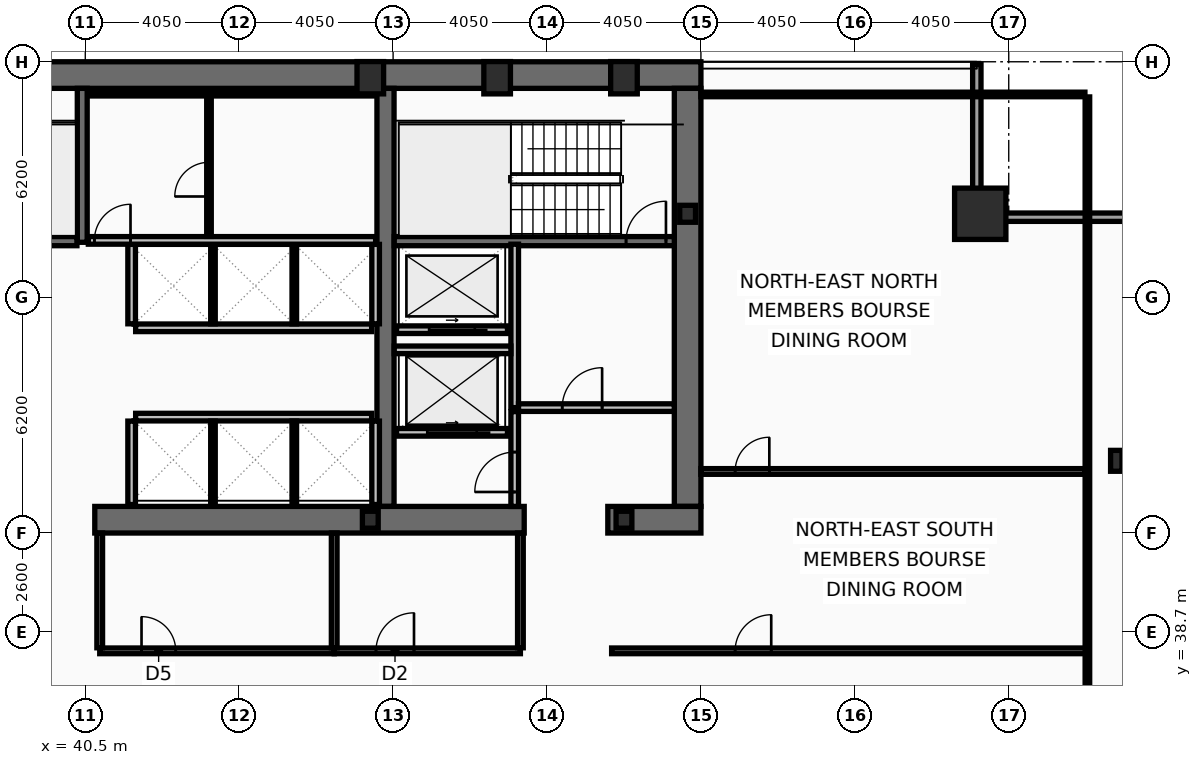
"""IFC4 building model, lengths in metres.
Left out: names, types, materials, properties, quantities, classifications, styles, units other than length and angle.
Written with IfcOpenShell. Run it as: python <this file> out.ifc"""

import sys

from ifc_helpers import new_model, si_unit, direction, frame, frame_2d, origin, origin_2d, place, context, subcontext, project, spatial, rectangle, hollow_rectangle, i_section, extrude, element, fill, save


model = new_model("IFC4")
c1 = context("Model", 3, precision=1e-05, world=origin(), true_north=direction((0.0, 1.0)))
c2 = subcontext(c1, "Body", "Model", "MODEL_VIEW")
j1 = project(units=[si_unit("LENGTHUNIT", "METRE"), si_unit("PLANEANGLEUNIT", "RADIAN")], contexts=[c1])
p1 = place(None, origin())
s1 = spatial("IfcSite", under=j1, at=p1, CompositionType="ELEMENT")
p2 = place(p1, origin())
s2 = spatial("IfcBuilding", under=s1, at=p2, CompositionType="ELEMENT")
p3 = place(p2, frame((0.0, 0.0, 168.6)))
s3 = spatial("IfcBuildingStorey", under=s2, at=p3, CompositionType="ELEMENT", Elevation=168.6)
p4 = place(p3, frame((16.2, 53.35, 0.0), z_axis=(0.0, 0.0, 1.0), x_axis=(1.0, 0.0, 0.0)))
e1 = element("IfcWall", 1, at=p4, inside=s3, PredefinedType="SHEAR", context=c2, shape_type="SweptSolid", body=[
    extrude(rectangle(XDim=40.5, YDim=0.7, at=frame_2d((20.25, 0.0))), origin(), (0.0, 0.0, 1.0), 3.38),
])
p5 = place(p3, frame((56.35, 53.0, 0.0), z_axis=(0.0, 0.0, 1.0), x_axis=(0.0, -1.0, 0.0)))
e2 = element("IfcWall", 2, at=p5, inside=s3, PredefinedType="SHEAR", context=c2, shape_type="SweptSolid", body=[
    extrude(rectangle(XDim=11.0, YDim=0.7, at=frame_2d((5.5, 0.0))), origin(), (0.0, 0.0, 1.0), 3.38),
])
p6 = place(p3, frame((48.4, 42.0, 0.0), z_axis=(0.0, 0.0, 1.0), x_axis=(0.0, 1.0, 0.0)))
e3 = element("IfcWall", 3, at=p6, inside=s3, PredefinedType="SHEAR", context=c2, shape_type="SweptSolid", body=[
    extrude(rectangle(XDim=11.0, YDim=0.45, at=frame_2d((5.5, 0.0))), origin(), (0.0, 0.0, 1.0), 3.38),
])
p7 = place(p3, frame((52.05, 41.65, 0.0), z_axis=(0.0, 0.0, 1.0), x_axis=(-1.0, 0.0, 0.0)))
e4 = element("IfcWall", 4, at=p7, inside=s3, PredefinedType="SHEAR", context=c2, shape_type="SweptSolid", body=[
    extrude(rectangle(XDim=11.3, YDim=0.7, at=frame_2d((5.65, 0.0))), origin(), (0.0, 0.0, 1.0), 3.38),
])
p8 = place(p3, frame((56.7, 41.65, 0.0), z_axis=(0.0, 0.0, 1.0), x_axis=(-1.0, 0.0, 0.0)))
e5 = element("IfcWall", 5, at=p8, inside=s3, PredefinedType="SHEAR", context=c2, shape_type="SweptSolid", body=[
    extrude(rectangle(XDim=2.45, YDim=0.7, at=frame_2d((1.225, 0.0))), origin(), (0.0, 0.0, 1.0), 3.38),
])
p9 = place(p3, frame((40.42, 48.95, 0.0), z_axis=(0.0, 0.0, 1.0), x_axis=(0.0, 1.0, 0.0)))
e6 = element("IfcWall", 6, at=p9, inside=s3, PredefinedType="SHEAR", context=c2, shape_type="SweptSolid", body=[
    extrude(rectangle(XDim=4.05, YDim=0.26, at=frame_2d((2.025, 0.0))), origin(), (0.0, 0.0, 1.0), 3.38),
])
p10 = place(p3, frame((48.63, 48.98, 0.0), z_axis=(0.0, 0.0, 1.0), x_axis=(1.0, 0.0, 0.0)))
e7 = element("IfcWall", 7, at=p10, inside=s3, PredefinedType="SHEAR", context=c2, shape_type="SweptSolid", body=[
    extrude(rectangle(XDim=7.37, YDim=0.24, at=frame_2d((3.685, 0.0))), origin(), (0.0, 0.0, 1.0), 3.38),
])
p11 = place(p10, frame((6.1, 0.0, 0.0)))
e8 = element("IfcOpeningElement", 8, at=p11, cuts=e7, PredefinedType="OPENING", context=c2, shape_type="SweptSolid", body=[
    extrude(rectangle(XDim=1.05, YDim=2.15, at=frame_2d((0.525, 1.075))), frame((0.0, 0.13, 0.0), z_axis=(0.0, -1.0, 0.0), x_axis=(1.0, 0.0, 0.0)), (0.0, 0.0, 1.0), 0.26),
])
p12 = place(p3, frame((32.72, 48.98, 0.0), z_axis=(0.0, 0.0, 1.0), x_axis=(1.0, 0.0, 0.0)))
e9 = element("IfcWall", 9, at=p12, inside=s3, PredefinedType="SHEAR", context=c2, shape_type="SweptSolid", body=[
    extrude(rectangle(XDim=7.56, YDim=0.24, at=frame_2d((3.78, 0.0))), origin(), (0.0, 0.0, 1.0), 3.38),
])
p13 = place(p12, frame((0.22, 0.0, 0.0)))
e10 = element("IfcOpeningElement", 10, at=p13, cuts=e9, PredefinedType="OPENING", context=c2, shape_type="SweptSolid", body=[
    extrude(rectangle(XDim=1.05, YDim=2.15, at=frame_2d((0.525, 1.075))), frame((0.0, 0.13, 0.0), z_axis=(0.0, -1.0, 0.0), x_axis=(1.0, 0.0, 0.0)), (0.0, 0.0, 1.0), 0.26),
])
p14 = place(p3, frame((64.05, 49.7, 0.0), z_axis=(0.0, 0.0, 1.0), x_axis=(1.0, 0.0, 0.0)))
e11 = element("IfcColumn", 11, at=p14, inside=s3, PredefinedType="COLUMN", context=c2, shape_type="SweptSolid", body=[
    extrude(hollow_rectangle(XDim=1.35, YDim=1.35, WallThickness=0.065, at=origin_2d()), origin(), (0.0, 0.0, 1.0), 3.6),
])
for number, where, z_axis, x_axis in (
    (12, (48.0, 53.28, 0.0), (0.0, 0.0, 1.0), (1.0, 0.0, 0.0)),
    (13, (51.337, 53.28, 0.0), (0.0, 0.0, 1.0), (1.0, 0.0, 0.0)),
    (14, (54.675, 53.28, 0.0), (0.0, 0.0, 1.0), (1.0, 0.0, 0.0)),
):
    element("IfcColumn", number, at=place(p3, frame(where, z_axis=z_axis, x_axis=x_axis)), inside=s3, PredefinedType="COLUMN", context=c2, shape_type="SweptSolid", body=[
        extrude(hollow_rectangle(XDim=0.7, YDim=0.85, WallThickness=0.05, at=origin_2d()), origin(), (0.0, 0.0, 1.0), 3.6),
    ])
p15 = place(p3, frame((67.63, 43.2, 0.0), z_axis=(0.0, 0.0, 1.0), x_axis=(1.0, 0.0, 0.0)))
e15 = element("IfcColumn", 15, at=p15, inside=s3, PredefinedType="COLUMN", context=c2, shape_type="SweptSolid", body=[
    extrude(i_section(OverallWidth=0.3, OverallDepth=0.55, WebThickness=0.015, FlangeThickness=0.029, at=origin_2d()), origin(), (0.0, 0.0, 1.0), 3.6),
])
for number, where, z_axis, x_axis in (
    (16, (56.35, 49.7, 0.0), (0.0, 0.0, 1.0), (1.0, 0.0, 0.0)),
    (17, (48.0, 41.65, 0.0), (0.0, 0.0, 1.0), (1.0, 0.0, 0.0)),
    (18, (54.675, 41.65, 0.0), (0.0, 0.0, 1.0), (1.0, 0.0, 0.0)),
):
    element("IfcColumn", number, at=place(p3, frame(where, z_axis=z_axis, x_axis=x_axis)), inside=s3, PredefinedType="COLUMN", context=c2, shape_type="SweptSolid", body=[
        extrude(i_section(OverallWidth=0.416, OverallDepth=0.446, WebThickness=0.039, FlangeThickness=0.063, at=origin_2d()), origin(), (0.0, 0.0, 1.0), 3.6),
    ])
p16 = place(p3, frame((63.96, 53.63, 0.0), z_axis=(0.0, 0.0, 1.0), x_axis=(0.0, -1.0, 0.0)))
e19 = element("IfcWall", 19, at=p16, inside=s3, PredefinedType="SOLIDWALL", context=c2, shape_type="SweptSolid", body=[
    extrude(rectangle(XDim=3.91, YDim=0.22, at=frame_2d((1.955, 0.0))), origin(), (0.0, 0.0, 1.0), 2.77),
])
p17 = place(p3, frame((63.85, 49.61, 0.0), z_axis=(0.0, 0.0, 1.0), x_axis=(1.0, 0.0, 0.0)))
e20 = element("IfcWall", 20, at=p17, inside=s3, PredefinedType="SOLIDWALL", context=c2, shape_type="SweptSolid", body=[
    extrude(rectangle(XDim=4.22, YDim=0.22, at=frame_2d((2.11, 0.0))), origin(), (0.0, 0.0, 1.0), 2.77),
])
p18 = place(p3, frame((51.61, 43.95, 0.0), z_axis=(0.0, 0.0, 1.0), x_axis=(-1.0, 0.0, 0.0)))
e21 = element("IfcWall", 21, at=p18, inside=s3, PredefinedType="PARTITIONING", context=c2, shape_type="SweptSolid", body=[
    extrude(rectangle(XDim=2.92, YDim=0.2, at=frame_2d((1.46, 0.0))), origin(), (0.0, 0.0, 1.0), 3.38),
])
p19 = place(p18, frame((0.81, 0.0, 0.0)))
e22 = element("IfcOpeningElement", 22, at=p19, cuts=e21, PredefinedType="OPENING", context=c2, shape_type="SweptSolid", body=[
    extrude(rectangle(XDim=1.3, YDim=2.18, at=frame_2d((0.65, 1.09))), frame((0.0, 0.11, 0.0), z_axis=(0.0, -1.0, 0.0), x_axis=(1.0, 0.0, 0.0)), (0.0, 0.0, 1.0), 0.22),
])
p20 = place(p3, frame((51.61, 46.65, 0.0), z_axis=(0.0, 0.0, 1.0), x_axis=(-1.0, 0.0, 0.0)))
e23 = element("IfcWall", 23, at=p20, inside=s3, PredefinedType="PARTITIONING", context=c2, shape_type="SweptSolid", body=[
    extrude(rectangle(XDim=2.92, YDim=0.2, at=frame_2d((1.46, 0.0))), origin(), (0.0, 0.0, 1.0), 3.38),
])
p21 = place(p20, frame((0.86, 0.0, 0.0)))
e24 = element("IfcOpeningElement", 24, at=p21, cuts=e23, PredefinedType="OPENING", context=c2, shape_type="SweptSolid", body=[
    extrude(rectangle(XDim=1.2, YDim=2.18, at=frame_2d((0.6, 1.09))), frame((0.0, 0.11, 0.0), z_axis=(0.0, -1.0, 0.0), x_axis=(1.0, 0.0, 0.0)), (0.0, 0.0, 1.0), 0.22),
])
p22 = place(p3, frame((51.8, 44.6, 0.0), z_axis=(0.0, 0.0, 1.0), x_axis=(0.0, 1.0, 0.0)))
e25 = element("IfcWall", 25, at=p22, inside=s3, PredefinedType="PARTITIONING", context=c2, shape_type="SweptSolid", body=[
    extrude(rectangle(XDim=4.3, YDim=0.2, at=frame_2d((2.15, 0.0))), origin(), (0.0, 0.0, 1.0), 3.38),
])
p23 = place(p3, frame((51.9, 44.6, 0.0), z_axis=(0.0, 0.0, 1.0), x_axis=(1.0, 0.0, 0.0)))
e26 = element("IfcWall", 26, at=p23, inside=s3, PredefinedType="PARTITIONING", context=c2, shape_type="SweptSolid", body=[
    extrude(rectangle(XDim=4.1, YDim=0.2, at=frame_2d((2.05, 0.0))), origin(), (0.0, 0.0, 1.0), 3.38),
])
p24 = place(p23, frame((1.15, 0.0, 0.0)))
e27 = element("IfcOpeningElement", 27, at=p24, cuts=e26, PredefinedType="OPENING", context=c2, shape_type="SweptSolid", body=[
    extrude(rectangle(XDim=1.05, YDim=2.15, at=frame_2d((0.525, 1.075))), frame((0.0, 0.11, 0.0), z_axis=(0.0, -1.0, 0.0), x_axis=(1.0, 0.0, 0.0)), (0.0, 0.0, 1.0), 0.22),
])
p25 = place(p3, frame((48.63, 46.12, 0.0), z_axis=(0.0, 0.0, 1.0), x_axis=(1.0, 0.0, 0.0)))
e28 = element("IfcWall", 28, at=p25, inside=s3, PredefinedType="PARTITIONING", context=c2, shape_type="SweptSolid", body=[
    extrude(rectangle(XDim=3.07, YDim=0.2, at=frame_2d((1.535, 0.0))), origin(), (0.0, 0.0, 1.0), 3.38),
])
p26 = place(p3, frame((51.8, 42.0, 0.0), z_axis=(0.0, 0.0, 1.0), x_axis=(0.0, 1.0, 0.0)))
e29 = element("IfcWall", 29, at=p26, inside=s3, PredefinedType="PARTITIONING", context=c2, shape_type="SweptSolid", body=[
    extrude(rectangle(XDim=2.495, YDim=0.2, at=frame_2d((1.248, 0.0))), origin(), (0.0, 0.0, 1.0), 3.38),
])
p27 = place(p26, frame((0.38, 0.0, 0.0)))
e30 = element("IfcOpeningElement", 30, at=p27, cuts=e29, PredefinedType="OPENING", context=c2, shape_type="SweptSolid", body=[
    extrude(rectangle(XDim=1.05, YDim=2.15, at=frame_2d((0.525, 1.075))), frame((0.0, 0.11, 0.0), z_axis=(0.0, -1.0, 0.0), x_axis=(1.0, 0.0, 0.0)), (0.0, 0.0, 1.0), 0.22),
])
p28 = place(p3, frame((41.825, 46.7, 0.0), z_axis=(0.0, 0.0, 1.0), x_axis=(1.0, 0.0, 0.0)))
e31 = element("IfcWall", 31, at=p28, inside=s3, PredefinedType="PARTITIONING", context=c2, shape_type="SweptSolid", body=[
    extrude(rectangle(XDim=6.21, YDim=0.2, at=frame_2d((3.105, 0.0))), origin(), (0.0, 0.0, 1.0), 3.38),
])
for number, where, z_axis, x_axis in (
    (32, (41.72, 46.805, 0.0), (0.0, 0.0, 1.0), (0.0, 1.0, 0.0)),
    (33, (48.14, 46.805, 0.0), (0.0, 0.0, 1.0), (0.0, 1.0, 0.0)),
):
    element("IfcWall", number, at=place(p3, frame(where, z_axis=z_axis, x_axis=x_axis)), inside=s3, PredefinedType="PARTITIONING", context=c2, shape_type="SweptSolid", body=[
        extrude(rectangle(XDim=2.09, YDim=0.2, at=frame_2d((1.045, 0.0))), origin(), (0.0, 0.0, 1.0), 3.38),
    ])
for number, where, z_axis, x_axis in (
    (34, (43.86, 46.805, 0.0), (0.0, 0.0, 1.0), (0.0, 1.0, 0.0)),
    (35, (46.0, 46.805, 0.0), (0.0, 0.0, 1.0), (0.0, 1.0, 0.0)),
):
    element("IfcWall", number, at=place(p3, frame(where, z_axis=z_axis, x_axis=x_axis)), inside=s3, PredefinedType="PARTITIONING", context=c2, shape_type="SweptSolid", body=[
        extrude(rectangle(XDim=2.09, YDim=0.12, at=frame_2d((1.045, 0.0))), origin(), (0.0, 0.0, 1.0), 3.38),
    ])
p29 = place(p3, frame((41.825, 44.35, 0.0), z_axis=(0.0, 0.0, 1.0), x_axis=(1.0, 0.0, 0.0)))
e36 = element("IfcWall", 36, at=p29, inside=s3, PredefinedType="PARTITIONING", context=c2, shape_type="SweptSolid", body=[
    extrude(rectangle(XDim=6.21, YDim=0.2, at=frame_2d((3.105, 0.0))), origin(), (0.0, 0.0, 1.0), 3.38),
])
for number, where, z_axis, x_axis in (
    (37, (41.72, 42.05, 0.0), (0.0, 0.0, 1.0), (0.0, 1.0, 0.0)),
    (38, (48.14, 42.05, 0.0), (0.0, 0.0, 1.0), (0.0, 1.0, 0.0)),
):
    element("IfcWall", number, at=place(p3, frame(where, z_axis=z_axis, x_axis=x_axis)), inside=s3, PredefinedType="PARTITIONING", context=c2, shape_type="SweptSolid", body=[
        extrude(rectangle(XDim=2.195, YDim=0.2, at=frame_2d((1.098, 0.0))), origin(), (0.0, 0.0, 1.0), 3.38),
    ])
for number, where, z_axis, x_axis in (
    (39, (43.86, 42.05, 0.0), (0.0, 0.0, 1.0), (0.0, 1.0, 0.0)),
    (40, (46.0, 42.05, 0.0), (0.0, 0.0, 1.0), (0.0, 1.0, 0.0)),
):
    element("IfcWall", number, at=place(p3, frame(where, z_axis=z_axis, x_axis=x_axis)), inside=s3, PredefinedType="PARTITIONING", context=c2, shape_type="SweptSolid", body=[
        extrude(rectangle(XDim=2.195, YDim=0.12, at=frame_2d((1.098, 0.0))), origin(), (0.0, 0.0, 1.0), 3.38),
    ])
p30 = place(p3, frame((40.58, 52.86, 0.0), z_axis=(0.0, 0.0, 1.0), x_axis=(1.0, 0.0, 0.0)))
e41 = element("IfcWall", 41, at=p30, inside=s3, PredefinedType="PARTITIONING", context=c2, shape_type="SweptSolid", body=[
    extrude(rectangle(XDim=7.56, YDim=0.12, at=frame_2d((3.78, 0.0))), origin(), (0.0, 0.0, 1.0), 3.38),
])
p31 = place(p3, frame((40.58, 49.0, 0.0), z_axis=(0.0, 0.0, 1.0), x_axis=(1.0, 0.0, 0.0)))
e42 = element("IfcWall", 42, at=p31, inside=s3, PredefinedType="PARTITIONING", context=c2, shape_type="SweptSolid", body=[
    extrude(rectangle(XDim=7.56, YDim=0.2, at=frame_2d((3.78, 0.0))), origin(), (0.0, 0.0, 1.0), 3.38),
])
p32 = place(p31, frame((0.16, 0.0, 0.0)))
e43 = element("IfcOpeningElement", 43, at=p32, cuts=e42, PredefinedType="OPENING", context=c2, shape_type="SweptSolid", body=[
    extrude(rectangle(XDim=0.95, YDim=2.1, at=frame_2d((0.475, 1.05))), frame((0.0, 0.11, 0.0), z_axis=(0.0, -1.0, 0.0), x_axis=(1.0, 0.0, 0.0)), (0.0, 0.0, 1.0), 0.22),
])
p33 = place(p3, frame((43.755, 49.105, 0.0), z_axis=(0.0, 0.0, 1.0), x_axis=(0.0, 1.0, 0.0)))
e44 = element("IfcWall", 44, at=p33, inside=s3, PredefinedType="PARTITIONING", context=c2, shape_type="SweptSolid", body=[
    extrude(rectangle(XDim=3.69, YDim=0.12, at=frame_2d((1.845, 0.0))), origin(), (0.0, 0.0, 1.0), 3.38),
])
p34 = place(p33, frame((1.05, 0.0, 0.0)))
e45 = element("IfcOpeningElement", 45, at=p34, cuts=e44, PredefinedType="OPENING", context=c2, shape_type="SweptSolid", body=[
    extrude(rectangle(XDim=0.9, YDim=2.05, at=frame_2d((0.45, 1.025))), frame((0.0, 0.07, 0.0), z_axis=(0.0, -1.0, 0.0), x_axis=(1.0, 0.0, 0.0)), (0.0, 0.0, 1.0), 0.14),
])
p35 = place(p3, frame((40.88, 38.2, 0.0), z_axis=(0.0, 0.0, 1.0), x_axis=(1.0, 0.0, 0.0)))
e46 = element("IfcWall", 46, at=p35, inside=s3, PredefinedType="PARTITIONING", context=c2, shape_type="SweptSolid", body=[
    extrude(rectangle(XDim=6.17, YDim=0.15, at=frame_2d((3.085, 0.0))), origin(), (0.0, 0.0, 1.0), 2.67),
])
p36 = place(p35, frame((1.1, 0.0, 0.0)))
e47 = element("IfcOpeningElement", 47, at=p36, cuts=e46, PredefinedType="OPENING", context=c2, shape_type="SweptSolid", body=[
    extrude(rectangle(XDim=0.9, YDim=2.05, at=frame_2d((0.45, 1.025))), frame((0.0, 0.085, 0.0), z_axis=(0.0, -1.0, 0.0), x_axis=(1.0, 0.0, 0.0)), (0.0, 0.0, 1.0), 0.17),
])
p37 = place(p3, frame((47.05, 38.2, 0.0), z_axis=(0.0, 0.0, 1.0), x_axis=(1.0, 0.0, 0.0)))
e48 = element("IfcWall", 48, at=p37, inside=s3, PredefinedType="PARTITIONING", context=c2, shape_type="SweptSolid", body=[
    extrude(rectangle(XDim=4.9, YDim=0.15, at=frame_2d((2.45, 0.0))), origin(), (0.0, 0.0, 1.0), 2.67),
])
p38 = place(p37, frame((1.1, 0.0, 0.0)))
e49 = element("IfcOpeningElement", 49, at=p38, cuts=e48, PredefinedType="OPENING", context=c2, shape_type="SweptSolid", body=[
    extrude(rectangle(XDim=1.0, YDim=2.05, at=frame_2d((0.5, 1.025))), frame((0.0, 0.085, 0.0), z_axis=(0.0, -1.0, 0.0), x_axis=(1.0, 0.0, 0.0)), (0.0, 0.0, 1.0), 0.17),
])
for number, where, z_axis, x_axis in (
    (50, (40.88, 38.28, 0.0), (0.0, 0.0, 1.0), (0.0, 1.0, 0.0)),
    (51, (47.05, 38.28, 0.0), (0.0, 0.0, 1.0), (0.0, 1.0, 0.0)),
    (52, (51.95, 38.28, 0.0), (0.0, 0.0, 1.0), (0.0, 1.0, 0.0)),
):
    element("IfcWall", number, at=place(p3, frame(where, z_axis=z_axis, x_axis=x_axis)), inside=s3, PredefinedType="PARTITIONING", context=c2, shape_type="SweptSolid", body=[
        extrude(rectangle(XDim=3.02, YDim=0.15, at=frame_2d((1.51, 0.0))), origin(), (0.0, 0.0, 1.0), 3.38),
    ])
p39 = place(p3, frame((54.35, 38.2, 0.0), z_axis=(0.0, 0.0, 1.0), x_axis=(1.0, 0.0, 0.0)))
e53 = element("IfcWall", 53, at=p39, inside=s3, PredefinedType="PARTITIONING", context=c2, shape_type="SweptSolid", body=[
    extrude(rectangle(XDim=12.52, YDim=0.15, at=frame_2d((6.26, 0.0))), origin(), (0.0, 0.0, 1.0), 2.67),
])
p40 = place(p39, frame((3.25, 0.0, 0.0)))
e54 = element("IfcOpeningElement", 54, at=p40, cuts=e53, PredefinedType="OPENING", context=c2, shape_type="SweptSolid", body=[
    extrude(rectangle(XDim=0.95, YDim=2.05, at=frame_2d((0.475, 1.025))), frame((0.0, 0.085, 0.0), z_axis=(0.0, -1.0, 0.0), x_axis=(1.0, 0.0, 0.0)), (0.0, 0.0, 1.0), 0.17),
])
p41 = place(p3, frame((56.7, 42.92, 0.0), z_axis=(0.0, 0.0, 1.0), x_axis=(1.0, 0.0, 0.0)))
e55 = element("IfcWall", 55, at=p41, inside=s3, PredefinedType="PARTITIONING", context=c2, shape_type="SweptSolid", body=[
    extrude(rectangle(XDim=10.105, YDim=0.15, at=frame_2d((5.052, 0.0))), origin(), (0.0, 0.0, 1.0), 2.67),
])
p42 = place(p41, frame((0.9, 0.0, 0.0)))
e56 = element("IfcOpeningElement", 56, at=p42, cuts=e55, PredefinedType="OPENING", context=c2, shape_type="SweptSolid", body=[
    extrude(rectangle(XDim=0.9, YDim=2.05, at=frame_2d((0.45, 1.025))), frame((0.0, 0.085, 0.0), z_axis=(0.0, -1.0, 0.0), x_axis=(1.0, 0.0, 0.0)), (0.0, 0.0, 1.0), 0.17),
])
p43 = place(p3, frame((66.87, 10.665, 0.0), z_axis=(0.0, 0.0, 1.0), x_axis=(0.0, 1.0, 0.0)))
e57 = element("IfcWall", 57, at=p43, inside=s3, PredefinedType="PARTITIONING", context=c2, shape_type="SweptSolid", body=[
    extrude(rectangle(XDim=42.11, YDim=0.12, at=frame_2d((21.055, 0.0))), origin(), (0.0, 0.0, 1.0), 2.67),
])
p44 = place(p3, frame((56.7, 52.84, 0.0), z_axis=(0.0, 0.0, 1.0), x_axis=(1.0, 0.0, 0.0)))
e58 = element("IfcWall", 58, at=p44, inside=s3, PredefinedType="PARTITIONING", context=c2, shape_type="SweptSolid", body=[
    extrude(rectangle(XDim=10.105, YDim=0.12, at=frame_2d((5.052, 0.0))), origin(), (0.0, 0.0, 1.0), 3.38),
])
p45 = place(p11, origin())
e59 = element("IfcDoor", 59, at=p45, inside=s3, OperationType="SINGLE_SWING_RIGHT", PredefinedType="DOOR", context=c2, shape_type="SweptSolid", body=[
    extrude(rectangle(XDim=1.05, YDim=2.15, at=frame_2d((0.525, 1.075))), frame((0.0, 0.025, 0.0), z_axis=(0.0, -1.0, 0.0), x_axis=(1.0, 0.0, 0.0)), (0.0, 0.0, 1.0), 0.05),
])
fill(e8, e59)
p46 = place(p19, origin())
e60 = element("IfcDoor", 60, at=p46, inside=s3, OperationType="SLIDING_TO_LEFT", PredefinedType="DOOR", context=c2, shape_type="SweptSolid", body=[
    extrude(rectangle(XDim=1.3, YDim=2.18, at=frame_2d((0.65, 1.09))), frame((0.0, 0.025, 0.0), z_axis=(0.0, -1.0, 0.0), x_axis=(1.0, 0.0, 0.0)), (0.0, 0.0, 1.0), 0.05),
])
fill(e22, e60)
p47 = place(p21, origin())
e61 = element("IfcDoor", 61, at=p47, inside=s3, OperationType="SLIDING_TO_LEFT", PredefinedType="DOOR", context=c2, shape_type="SweptSolid", body=[
    extrude(rectangle(XDim=1.2, YDim=2.18, at=frame_2d((0.6, 1.09))), frame((0.0, 0.025, 0.0), z_axis=(0.0, -1.0, 0.0), x_axis=(1.0, 0.0, 0.0)), (0.0, 0.0, 1.0), 0.05),
])
fill(e24, e61)
p48 = place(p24, origin())
e62 = element("IfcDoor", 62, at=p48, inside=s3, OperationType="SINGLE_SWING_RIGHT", PredefinedType="DOOR", context=c2, shape_type="SweptSolid", body=[
    extrude(rectangle(XDim=1.05, YDim=2.15, at=frame_2d((0.525, 1.075))), frame((0.0, 0.025, 0.0), z_axis=(0.0, -1.0, 0.0), x_axis=(1.0, 0.0, 0.0)), (0.0, 0.0, 1.0), 0.05),
])
fill(e27, e62)
p49 = place(p27, origin())
e63 = element("IfcDoor", 63, at=p49, inside=s3, OperationType="SINGLE_SWING_LEFT", PredefinedType="DOOR", context=c2, shape_type="SweptSolid", body=[
    extrude(rectangle(XDim=1.05, YDim=2.15, at=frame_2d((0.525, 1.075))), frame((0.0, 0.025, 0.0), z_axis=(0.0, -1.0, 0.0), x_axis=(1.0, 0.0, 0.0)), (0.0, 0.0, 1.0), 0.05),
])
fill(e30, e63)
p50 = place(p32, origin())
e64 = element("IfcDoor", 64, at=p50, inside=s3, OperationType="SINGLE_SWING_RIGHT", PredefinedType="DOOR", context=c2, shape_type="SweptSolid", body=[
    extrude(rectangle(XDim=0.95, YDim=2.1, at=frame_2d((0.475, 1.05))), frame((0.0, 0.025, 0.0), z_axis=(0.0, -1.0, 0.0), x_axis=(1.0, 0.0, 0.0)), (0.0, 0.0, 1.0), 0.05),
])
fill(e43, e64)
p51 = place(p34, origin())
e65 = element("IfcDoor", 65, at=p51, inside=s3, OperationType="SINGLE_SWING_LEFT", PredefinedType="DOOR", context=c2, shape_type="SweptSolid", body=[
    extrude(rectangle(XDim=0.9, YDim=2.05, at=frame_2d((0.45, 1.025))), frame((0.0, 0.025, 0.0), z_axis=(0.0, -1.0, 0.0), x_axis=(1.0, 0.0, 0.0)), (0.0, 0.0, 1.0), 0.05),
])
fill(e45, e65)
p52 = place(p36, origin())
e66 = element("IfcDoor", 66, at=p52, inside=s3, OperationType="SINGLE_SWING_LEFT", PredefinedType="DOOR", context=c2, shape_type="SweptSolid", body=[
    extrude(rectangle(XDim=0.9, YDim=2.05, at=frame_2d((0.45, 1.025))), frame((0.0, 0.025, 0.0), z_axis=(0.0, -1.0, 0.0), x_axis=(1.0, 0.0, 0.0)), (0.0, 0.0, 1.0), 0.05),
])
fill(e47, e66)
p53 = place(p38, origin())
e67 = element("IfcDoor", 67, at=p53, inside=s3, OperationType="SINGLE_SWING_RIGHT", PredefinedType="DOOR", context=c2, shape_type="SweptSolid", body=[
    extrude(rectangle(XDim=1.0, YDim=2.05, at=frame_2d((0.5, 1.025))), frame((0.0, 0.025, 0.0), z_axis=(0.0, -1.0, 0.0), x_axis=(1.0, 0.0, 0.0)), (0.0, 0.0, 1.0), 0.05),
])
fill(e49, e67)
p54 = place(p40, origin())
e68 = element("IfcDoor", 68, at=p54, inside=s3, OperationType="SINGLE_SWING_RIGHT", PredefinedType="DOOR", context=c2, shape_type="SweptSolid", body=[
    extrude(rectangle(XDim=0.95, YDim=2.05, at=frame_2d((0.475, 1.025))), frame((0.0, 0.025, 0.0), z_axis=(0.0, -1.0, 0.0), x_axis=(1.0, 0.0, 0.0)), (0.0, 0.0, 1.0), 0.05),
])
fill(e54, e68)
p55 = place(p42, origin())
e69 = element("IfcDoor", 69, at=p55, inside=s3, OperationType="SINGLE_SWING_RIGHT", PredefinedType="DOOR", context=c2, shape_type="SweptSolid", body=[
    extrude(rectangle(XDim=0.9, YDim=2.05, at=frame_2d((0.45, 1.025))), frame((0.0, 0.025, 0.0), z_axis=(0.0, -1.0, 0.0), x_axis=(1.0, 0.0, 0.0)), (0.0, 0.0, 1.0), 0.05),
])
fill(e56, e69)
save(model, sys.argv[1])
